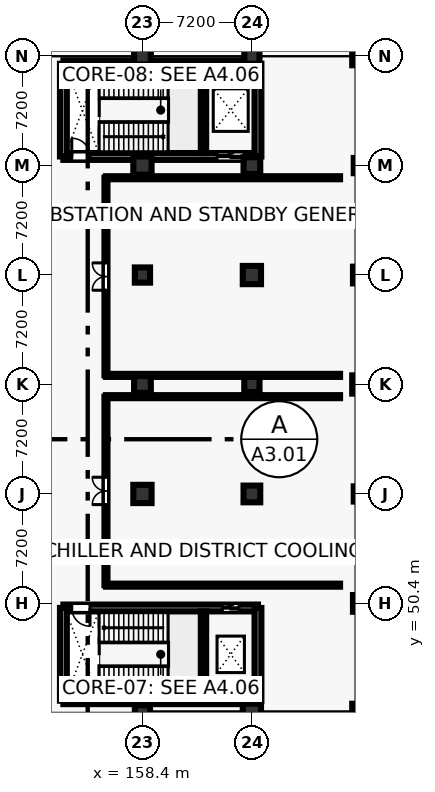
"""IFC4 building model, lengths in metres.
Left out: names, types, materials, properties, quantities, classifications, styles, units other than length and angle.
Written with IfcOpenShell. Run it as: python <this file> out.ifc"""

import sys

from ifc_helpers import new_model, si_unit, direction, frame, frame_2d, origin, origin_2d, place, context, subcontext, project, spatial, rectangle, circle, extrude, element, fill, save


model = new_model("IFC4")
c1 = context("Model", 3, precision=1e-05, world=origin(), true_north=direction((0.0, 1.0)))
c2 = subcontext(c1, "Body", "Model", "MODEL_VIEW")
j1 = project(units=[si_unit("LENGTHUNIT", "METRE"), si_unit("PLANEANGLEUNIT", "RADIAN")], contexts=[c1])
p1 = place(None, origin())
s1 = spatial("IfcSite", under=j1, at=p1, CompositionType="ELEMENT")
p2 = place(p1, origin())
s2 = spatial("IfcBuilding", under=s1, at=p2, CompositionType="ELEMENT")
p3 = place(p2, frame((0.0, 0.0, -5.4)))
s3 = spatial("IfcBuildingStorey", under=s2, at=p3, CompositionType="ELEMENT", Elevation=-5.4)
p4 = place(p3, frame((158.4, 43.2, 0.0), z_axis=(0.0, 0.0, 1.0), x_axis=(1.0, 0.0, 0.0)))
e1 = element("IfcColumn", 1, at=p4, inside=s3, PredefinedType="COLUMN", context=c2, shape_type="SweptSolid", body=[
    extrude(rectangle(XDim=1.0, YDim=1.0, at=origin_2d()), origin(), (0.0, 0.0, 1.0), 5.4),
])
p5 = place(p3, frame((158.4, 57.6, 0.0), z_axis=(0.0, 0.0, 1.0), x_axis=(1.0, 0.0, 0.0)))
e2 = element("IfcColumn", 2, at=p5, inside=s3, PredefinedType="COLUMN", context=c2, shape_type="SweptSolid", body=[
    extrude(circle(Radius=0.6, at=origin_2d()), origin(), (0.0, 0.0, 1.0), 5.4),
])
p6 = place(p3, frame((158.4, 64.8, 0.0), z_axis=(0.0, 0.0, 1.0), x_axis=(1.0, 0.0, 0.0)))
e3 = element("IfcColumn", 3, at=p6, inside=s3, PredefinedType="COLUMN", context=c2, shape_type="SweptSolid", body=[
    extrude(rectangle(XDim=1.1, YDim=1.1, at=origin_2d()), origin(), (0.0, 0.0, 1.0), 5.4),
])
p7 = place(p3, frame((158.4, 72.0, 0.0), z_axis=(0.0, 0.0, 1.0), x_axis=(1.0, 0.0, 0.0)))
e4 = element("IfcColumn", 4, at=p7, inside=s3, PredefinedType="COLUMN", context=c2, shape_type="SweptSolid", body=[
    extrude(rectangle(XDim=1.0, YDim=1.0, at=origin_2d()), origin(), (0.0, 0.0, 1.0), 5.4),
])
p8 = place(p3, frame((158.4, 79.2, 0.0), z_axis=(0.0, 0.0, 1.0), x_axis=(1.0, 0.0, 0.0)))
e5 = element("IfcColumn", 5, at=p8, inside=s3, PredefinedType="COLUMN", context=c2, shape_type="SweptSolid", body=[
    extrude(circle(Radius=0.6, at=origin_2d()), origin(), (0.0, 0.0, 1.0), 5.4),
])
p9 = place(p3, frame((158.4, 86.4, 0.0), z_axis=(0.0, 0.0, 1.0), x_axis=(1.0, 0.0, 0.0)))
e6 = element("IfcColumn", 6, at=p9, inside=s3, PredefinedType="COLUMN", context=c2, shape_type="SweptSolid", body=[
    extrude(rectangle(XDim=1.1, YDim=1.1, at=origin_2d()), origin(), (0.0, 0.0, 1.0), 5.4),
])
p10 = place(p3, frame((165.6, 43.2, 0.0), z_axis=(0.0, 0.0, 1.0), x_axis=(1.0, 0.0, 0.0)))
e7 = element("IfcColumn", 7, at=p10, inside=s3, PredefinedType="COLUMN", context=c2, shape_type="SweptSolid", body=[
    extrude(circle(Radius=0.6, at=origin_2d()), origin(), (0.0, 0.0, 1.0), 5.4),
])
p11 = place(p3, frame((165.6, 57.6, 0.0), z_axis=(0.0, 0.0, 1.0), x_axis=(1.0, 0.0, 0.0)))
e8 = element("IfcColumn", 8, at=p11, inside=s3, PredefinedType="COLUMN", context=c2, shape_type="SweptSolid", body=[
    extrude(rectangle(XDim=1.1, YDim=1.1, at=origin_2d()), origin(), (0.0, 0.0, 1.0), 5.4),
])
p12 = place(p3, frame((165.6, 64.8, 0.0), z_axis=(0.0, 0.0, 1.0), x_axis=(1.0, 0.0, 0.0)))
e9 = element("IfcColumn", 9, at=p12, inside=s3, PredefinedType="COLUMN", context=c2, shape_type="SweptSolid", body=[
    extrude(rectangle(XDim=1.0, YDim=1.0, at=origin_2d()), origin(), (0.0, 0.0, 1.0), 5.4),
])
p13 = place(p3, frame((165.6, 72.0, 0.0), z_axis=(0.0, 0.0, 1.0), x_axis=(1.0, 0.0, 0.0)))
e10 = element("IfcColumn", 10, at=p13, inside=s3, PredefinedType="COLUMN", context=c2, shape_type="SweptSolid", body=[
    extrude(circle(Radius=0.6, at=origin_2d()), origin(), (0.0, 0.0, 1.0), 5.4),
])
p14 = place(p3, frame((165.6, 79.2, 0.0), z_axis=(0.0, 0.0, 1.0), x_axis=(1.0, 0.0, 0.0)))
e11 = element("IfcColumn", 11, at=p14, inside=s3, PredefinedType="COLUMN", context=c2, shape_type="SweptSolid", body=[
    extrude(rectangle(XDim=1.1, YDim=1.1, at=origin_2d()), origin(), (0.0, 0.0, 1.0), 5.4),
])
p15 = place(p3, frame((165.6, 86.4, 0.0), z_axis=(0.0, 0.0, 1.0), x_axis=(1.0, 0.0, 0.0)))
e12 = element("IfcColumn", 12, at=p15, inside=s3, PredefinedType="COLUMN", context=c2, shape_type="SweptSolid", body=[
    extrude(rectangle(XDim=1.0, YDim=1.0, at=origin_2d()), origin(), (0.0, 0.0, 1.0), 5.4),
])
p16 = place(p3, frame((172.8, 43.2, 0.0), z_axis=(0.0, 0.0, 1.0), x_axis=(1.0, 0.0, 0.0)))
e13 = element("IfcColumn", 13, at=p16, inside=s3, PredefinedType="COLUMN", context=c2, shape_type="SweptSolid", body=[
    extrude(circle(Radius=0.6, at=origin_2d()), origin(), (0.0, 0.0, 1.0), 5.4),
])
p17 = place(p3, frame((172.8, 50.4, 0.0), z_axis=(0.0, 0.0, 1.0), x_axis=(1.0, 0.0, 0.0)))
e14 = element("IfcColumn", 14, at=p17, inside=s3, PredefinedType="COLUMN", context=c2, shape_type="SweptSolid", body=[
    extrude(rectangle(XDim=1.1, YDim=1.1, at=origin_2d()), origin(), (0.0, 0.0, 1.0), 5.4),
])
p18 = place(p3, frame((172.8, 57.6, 0.0), z_axis=(0.0, 0.0, 1.0), x_axis=(1.0, 0.0, 0.0)))
e15 = element("IfcColumn", 15, at=p18, inside=s3, PredefinedType="COLUMN", context=c2, shape_type="SweptSolid", body=[
    extrude(rectangle(XDim=1.0, YDim=1.0, at=origin_2d()), origin(), (0.0, 0.0, 1.0), 5.4),
])
p19 = place(p3, frame((172.8, 64.8, 0.0), z_axis=(0.0, 0.0, 1.0), x_axis=(1.0, 0.0, 0.0)))
e16 = element("IfcColumn", 16, at=p19, inside=s3, PredefinedType="COLUMN", context=c2, shape_type="SweptSolid", body=[
    extrude(circle(Radius=0.6, at=origin_2d()), origin(), (0.0, 0.0, 1.0), 5.4),
])
p20 = place(p3, frame((172.8, 72.0, 0.0), z_axis=(0.0, 0.0, 1.0), x_axis=(1.0, 0.0, 0.0)))
e17 = element("IfcColumn", 17, at=p20, inside=s3, PredefinedType="COLUMN", context=c2, shape_type="SweptSolid", body=[
    extrude(rectangle(XDim=1.1, YDim=1.1, at=origin_2d()), origin(), (0.0, 0.0, 1.0), 5.4),
])
p21 = place(p3, frame((172.8, 79.2, 0.0), z_axis=(0.0, 0.0, 1.0), x_axis=(1.0, 0.0, 0.0)))
e18 = element("IfcColumn", 18, at=p21, inside=s3, PredefinedType="COLUMN", context=c2, shape_type="SweptSolid", body=[
    extrude(rectangle(XDim=1.0, YDim=1.0, at=origin_2d()), origin(), (0.0, 0.0, 1.0), 5.4),
])
p22 = place(p3, frame((172.8, 86.4, 0.0), z_axis=(0.0, 0.0, 1.0), x_axis=(1.0, 0.0, 0.0)))
e19 = element("IfcColumn", 19, at=p22, inside=s3, PredefinedType="COLUMN", context=c2, shape_type="SweptSolid", body=[
    extrude(circle(Radius=0.6, at=origin_2d()), origin(), (0.0, 0.0, 1.0), 5.4),
])
p23 = place(p3, frame((153.2, 44.0, 0.0), z_axis=(0.0, 0.0, 1.0), x_axis=(1.0, 0.0, 0.0)))
e20 = element("IfcWall", 20, at=p23, inside=s3, PredefinedType="SHEAR", context=c2, shape_type="SweptSolid", body=[
    extrude(rectangle(XDim=12.8, YDim=0.45, at=frame_2d((6.4, 0.0))), origin(), (0.0, 0.0, 1.0), 5.02),
])
p24 = place(p3, frame((153.2, 50.1, 0.0), z_axis=(0.0, 0.0, 1.0), x_axis=(1.0, 0.0, 0.0)))
e21 = element("IfcWall", 21, at=p24, inside=s3, PredefinedType="SHEAR", context=c2, shape_type="SweptSolid", body=[
    extrude(rectangle(XDim=12.8, YDim=0.45, at=frame_2d((6.4, 0.0))), origin(), (0.0, 0.0, 1.0), 5.02),
])
p25 = place(p24, frame((0.55, 0.0, 0.0)))
e22 = element("IfcOpeningElement", 22, at=p25, cuts=e21, PredefinedType="OPENING", context=c2, shape_type="SweptSolid", body=[
    extrude(rectangle(XDim=1.2, YDim=2.25, at=frame_2d((0.6, 1.125))), frame((0.0, 0.235, 0.0), z_axis=(0.0, -1.0, 0.0), x_axis=(1.0, 0.0, 0.0)), (0.0, 0.0, 1.0), 0.47),
])
p26 = place(p24, frame((10.458, 0.0, 0.0)))
e23 = element("IfcOpeningElement", 23, at=p26, cuts=e21, PredefinedType="OPENING", context=c2, shape_type="SweptSolid", body=[
    extrude(rectangle(XDim=1.1, YDim=2.2, at=frame_2d((0.55, 1.1))), frame((0.0, 0.235, 0.0), z_axis=(0.0, -1.0, 0.0), x_axis=(1.0, 0.0, 0.0)), (0.0, 0.0, 1.0), 0.47),
])
for number, where, z_axis, x_axis in (
    (24, (153.2, 44.0, 0.0), (0.0, 0.0, 1.0), (0.0, 1.0, 0.0)),
    (25, (166.0, 44.0, 0.0), (0.0, 0.0, 1.0), (0.0, 1.0, 0.0)),
):
    element("IfcWall", number, at=place(p3, frame(where, z_axis=z_axis, x_axis=x_axis)), inside=s3, PredefinedType="SHEAR", context=c2, shape_type="SweptSolid", body=[
        extrude(rectangle(XDim=6.1, YDim=0.45, at=frame_2d((3.05, 0.0))), origin(), (0.0, 0.0, 1.0), 5.02),
    ])
p27 = place(p3, frame((162.416, 44.225, 0.0), z_axis=(0.0, 0.0, 1.0), x_axis=(0.0, 1.0, 0.0)))
e26 = element("IfcWall", 26, at=p27, inside=s3, PredefinedType="SHEAR", context=c2, shape_type="SweptSolid", body=[
    extrude(rectangle(XDim=5.65, YDim=0.35, at=frame_2d((2.825, 0.0))), origin(), (0.0, 0.0, 1.0), 5.02),
])
p28 = place(p3, frame((153.2, 79.8, 0.0), z_axis=(0.0, 0.0, 1.0), x_axis=(1.0, 0.0, 0.0)))
e27 = element("IfcWall", 27, at=p28, inside=s3, PredefinedType="SHEAR", context=c2, shape_type="SweptSolid", body=[
    extrude(rectangle(XDim=12.8, YDim=0.45, at=frame_2d((6.4, 0.0))), origin(), (0.0, 0.0, 1.0), 5.02),
])
p29 = place(p28, frame((0.55, 0.0, 0.0)))
e28 = element("IfcOpeningElement", 28, at=p29, cuts=e27, PredefinedType="OPENING", context=c2, shape_type="SweptSolid", body=[
    extrude(rectangle(XDim=1.2, YDim=2.25, at=frame_2d((0.6, 1.125))), frame((0.0, 0.235, 0.0), z_axis=(0.0, -1.0, 0.0), x_axis=(1.0, 0.0, 0.0)), (0.0, 0.0, 1.0), 0.47),
])
p30 = place(p28, frame((10.108, 0.0, 0.0)))
e29 = element("IfcOpeningElement", 29, at=p30, cuts=e27, PredefinedType="OPENING", context=c2, shape_type="SweptSolid", body=[
    extrude(rectangle(XDim=1.8, YDim=2.4, at=frame_2d((0.9, 1.2))), frame((0.0, 0.235, 0.0), z_axis=(0.0, -1.0, 0.0), x_axis=(1.0, 0.0, 0.0)), (0.0, 0.0, 1.0), 0.47),
])
p31 = place(p3, frame((153.2, 85.9, 0.0), z_axis=(0.0, 0.0, 1.0), x_axis=(1.0, 0.0, 0.0)))
e30 = element("IfcWall", 30, at=p31, inside=s3, PredefinedType="SHEAR", context=c2, shape_type="SweptSolid", body=[
    extrude(rectangle(XDim=12.8, YDim=0.45, at=frame_2d((6.4, 0.0))), origin(), (0.0, 0.0, 1.0), 5.02),
])
for number, where, z_axis, x_axis in (
    (31, (153.2, 79.8, 0.0), (0.0, 0.0, 1.0), (0.0, 1.0, 0.0)),
    (32, (166.0, 79.8, 0.0), (0.0, 0.0, 1.0), (0.0, 1.0, 0.0)),
):
    element("IfcWall", number, at=place(p3, frame(where, z_axis=z_axis, x_axis=x_axis)), inside=s3, PredefinedType="SHEAR", context=c2, shape_type="SweptSolid", body=[
        extrude(rectangle(XDim=6.1, YDim=0.45, at=frame_2d((3.05, 0.0))), origin(), (0.0, 0.0, 1.0), 5.02),
    ])
p32 = place(p3, frame((162.416, 80.025, 0.0), z_axis=(0.0, 0.0, 1.0), x_axis=(0.0, 1.0, 0.0)))
e33 = element("IfcWall", 33, at=p32, inside=s3, PredefinedType="SHEAR", context=c2, shape_type="SweptSolid", body=[
    extrude(rectangle(XDim=5.65, YDim=0.35, at=frame_2d((2.825, 0.0))), origin(), (0.0, 0.0, 1.0), 5.02),
])
for number, where, z_axis, x_axis in (
    (34, (156.0, 51.6, 0.0), (0.0, 0.0, 1.0), (1.0, 0.0, 0.0)),
    (35, (171.4, 64.0, 0.0), (0.0, 0.0, 1.0), (-1.0, 0.0, 0.0)),
):
    element("IfcWall", number, at=place(p3, frame(where, z_axis=z_axis, x_axis=x_axis)), inside=s3, PredefinedType="PARTITIONING", context=c2, shape_type="SweptSolid", body=[
        extrude(rectangle(XDim=15.4, YDim=0.2, at=frame_2d((7.7, 0.0))), origin(), (0.0, 0.0, 1.0), 4.04),
    ])
p33 = place(p3, frame((156.0, 64.0, 0.0), z_axis=(0.0, 0.0, 1.0), x_axis=(0.0, -1.0, 0.0)))
e36 = element("IfcWall", 36, at=p33, inside=s3, PredefinedType="PARTITIONING", context=c2, shape_type="SweptSolid", body=[
    extrude(rectangle(XDim=12.4, YDim=0.2, at=frame_2d((6.2, 0.0))), origin(), (0.0, 0.0, 1.0), 4.04),
])
p34 = place(p33, frame((5.3, 0.0, 0.0)))
e37 = element("IfcOpeningElement", 37, at=p34, cuts=e36, PredefinedType="OPENING", context=c2, shape_type="SweptSolid", body=[
    extrude(rectangle(XDim=1.8, YDim=2.3, at=frame_2d((0.9, 1.15))), frame((0.0, 0.11, 0.0), z_axis=(0.0, -1.0, 0.0), x_axis=(1.0, 0.0, 0.0)), (0.0, 0.0, 1.0), 0.22),
])
for number, where, z_axis, x_axis in (
    (38, (156.0, 65.4, 0.0), (0.0, 0.0, 1.0), (1.0, 0.0, 0.0)),
    (39, (171.4, 78.4, 0.0), (0.0, 0.0, 1.0), (-1.0, 0.0, 0.0)),
):
    element("IfcWall", number, at=place(p3, frame(where, z_axis=z_axis, x_axis=x_axis)), inside=s3, PredefinedType="PARTITIONING", context=c2, shape_type="SweptSolid", body=[
        extrude(rectangle(XDim=15.4, YDim=0.2, at=frame_2d((7.7, 0.0))), origin(), (0.0, 0.0, 1.0), 4.04),
    ])
p35 = place(p3, frame((156.0, 78.4, 0.0), z_axis=(0.0, 0.0, 1.0), x_axis=(0.0, -1.0, 0.0)))
e40 = element("IfcWall", 40, at=p35, inside=s3, PredefinedType="PARTITIONING", context=c2, shape_type="SweptSolid", body=[
    extrude(rectangle(XDim=13.0, YDim=0.2, at=frame_2d((6.5, 0.0))), origin(), (0.0, 0.0, 1.0), 4.04),
])
p36 = place(p35, frame((5.6, 0.0, 0.0)))
e41 = element("IfcOpeningElement", 41, at=p36, cuts=e40, PredefinedType="OPENING", context=c2, shape_type="SweptSolid", body=[
    extrude(rectangle(XDim=1.8, YDim=2.3, at=frame_2d((0.9, 1.15))), frame((0.0, 0.11, 0.0), z_axis=(0.0, -1.0, 0.0), x_axis=(1.0, 0.0, 0.0)), (0.0, 0.0, 1.0), 0.22),
])
p37 = place(p25, frame((1.2, 0.0, 0.0), z_axis=(0.0, 0.0, 1.0), x_axis=(-1.0, 0.0, 0.0)))
e42 = element("IfcDoor", 42, at=p37, inside=s3, OperationType="SINGLE_SWING_RIGHT", PredefinedType="DOOR", context=c2, shape_type="SweptSolid", body=[
    extrude(rectangle(XDim=1.2, YDim=2.25, at=frame_2d((0.6, 1.125))), frame((0.0, 0.025, 0.0), z_axis=(0.0, -1.0, 0.0), x_axis=(1.0, 0.0, 0.0)), (0.0, 0.0, 1.0), 0.05),
])
fill(e22, e42)
p38 = place(p26, origin())
e43 = element("IfcDoor", 43, at=p38, inside=s3, OperationType="SLIDING_TO_LEFT", PredefinedType="DOOR", context=c2, shape_type="SweptSolid", body=[
    extrude(rectangle(XDim=1.1, YDim=2.2, at=frame_2d((0.55, 1.1))), frame((0.0, 0.025, 0.0), z_axis=(0.0, -1.0, 0.0), x_axis=(1.0, 0.0, 0.0)), (0.0, 0.0, 1.0), 0.05),
])
fill(e23, e43)
p39 = place(p29, origin())
e44 = element("IfcDoor", 44, at=p39, inside=s3, OperationType="SINGLE_SWING_LEFT", PredefinedType="DOOR", context=c2, shape_type="SweptSolid", body=[
    extrude(rectangle(XDim=1.2, YDim=2.25, at=frame_2d((0.6, 1.125))), frame((0.0, 0.025, 0.0), z_axis=(0.0, -1.0, 0.0), x_axis=(1.0, 0.0, 0.0)), (0.0, 0.0, 1.0), 0.05),
])
fill(e28, e44)
p40 = place(p30, origin())
e45 = element("IfcDoor", 45, at=p40, inside=s3, OperationType="SLIDING_TO_LEFT", PredefinedType="DOOR", context=c2, shape_type="SweptSolid", body=[
    extrude(rectangle(XDim=1.8, YDim=2.4, at=frame_2d((0.9, 1.2))), frame((0.0, 0.025, 0.0), z_axis=(0.0, -1.0, 0.0), x_axis=(1.0, 0.0, 0.0)), (0.0, 0.0, 1.0), 0.05),
])
fill(e29, e45)
p41 = place(p34, frame((1.8, 0.0, 0.0), z_axis=(0.0, 0.0, 1.0), x_axis=(-1.0, 0.0, 0.0)))
e46 = element("IfcDoor", 46, at=p41, inside=s3, OperationType="DOUBLE_DOOR_SINGLE_SWING", PredefinedType="DOOR", context=c2, shape_type="SweptSolid", body=[
    extrude(rectangle(XDim=1.8, YDim=2.3, at=frame_2d((0.9, 1.15))), frame((0.0, 0.025, 0.0), z_axis=(0.0, -1.0, 0.0), x_axis=(1.0, 0.0, 0.0)), (0.0, 0.0, 1.0), 0.05),
])
fill(e37, e46)
p42 = place(p36, frame((1.8, 0.0, 0.0), z_axis=(0.0, 0.0, 1.0), x_axis=(-1.0, 0.0, 0.0)))
e47 = element("IfcDoor", 47, at=p42, inside=s3, OperationType="DOUBLE_DOOR_SINGLE_SWING", PredefinedType="DOOR", context=c2, shape_type="SweptSolid", body=[
    extrude(rectangle(XDim=1.8, YDim=2.3, at=frame_2d((0.9, 1.15))), frame((0.0, 0.025, 0.0), z_axis=(0.0, -1.0, 0.0), x_axis=(1.0, 0.0, 0.0)), (0.0, 0.0, 1.0), 0.05),
])
fill(e41, e47)
save(model, sys.argv[1])
